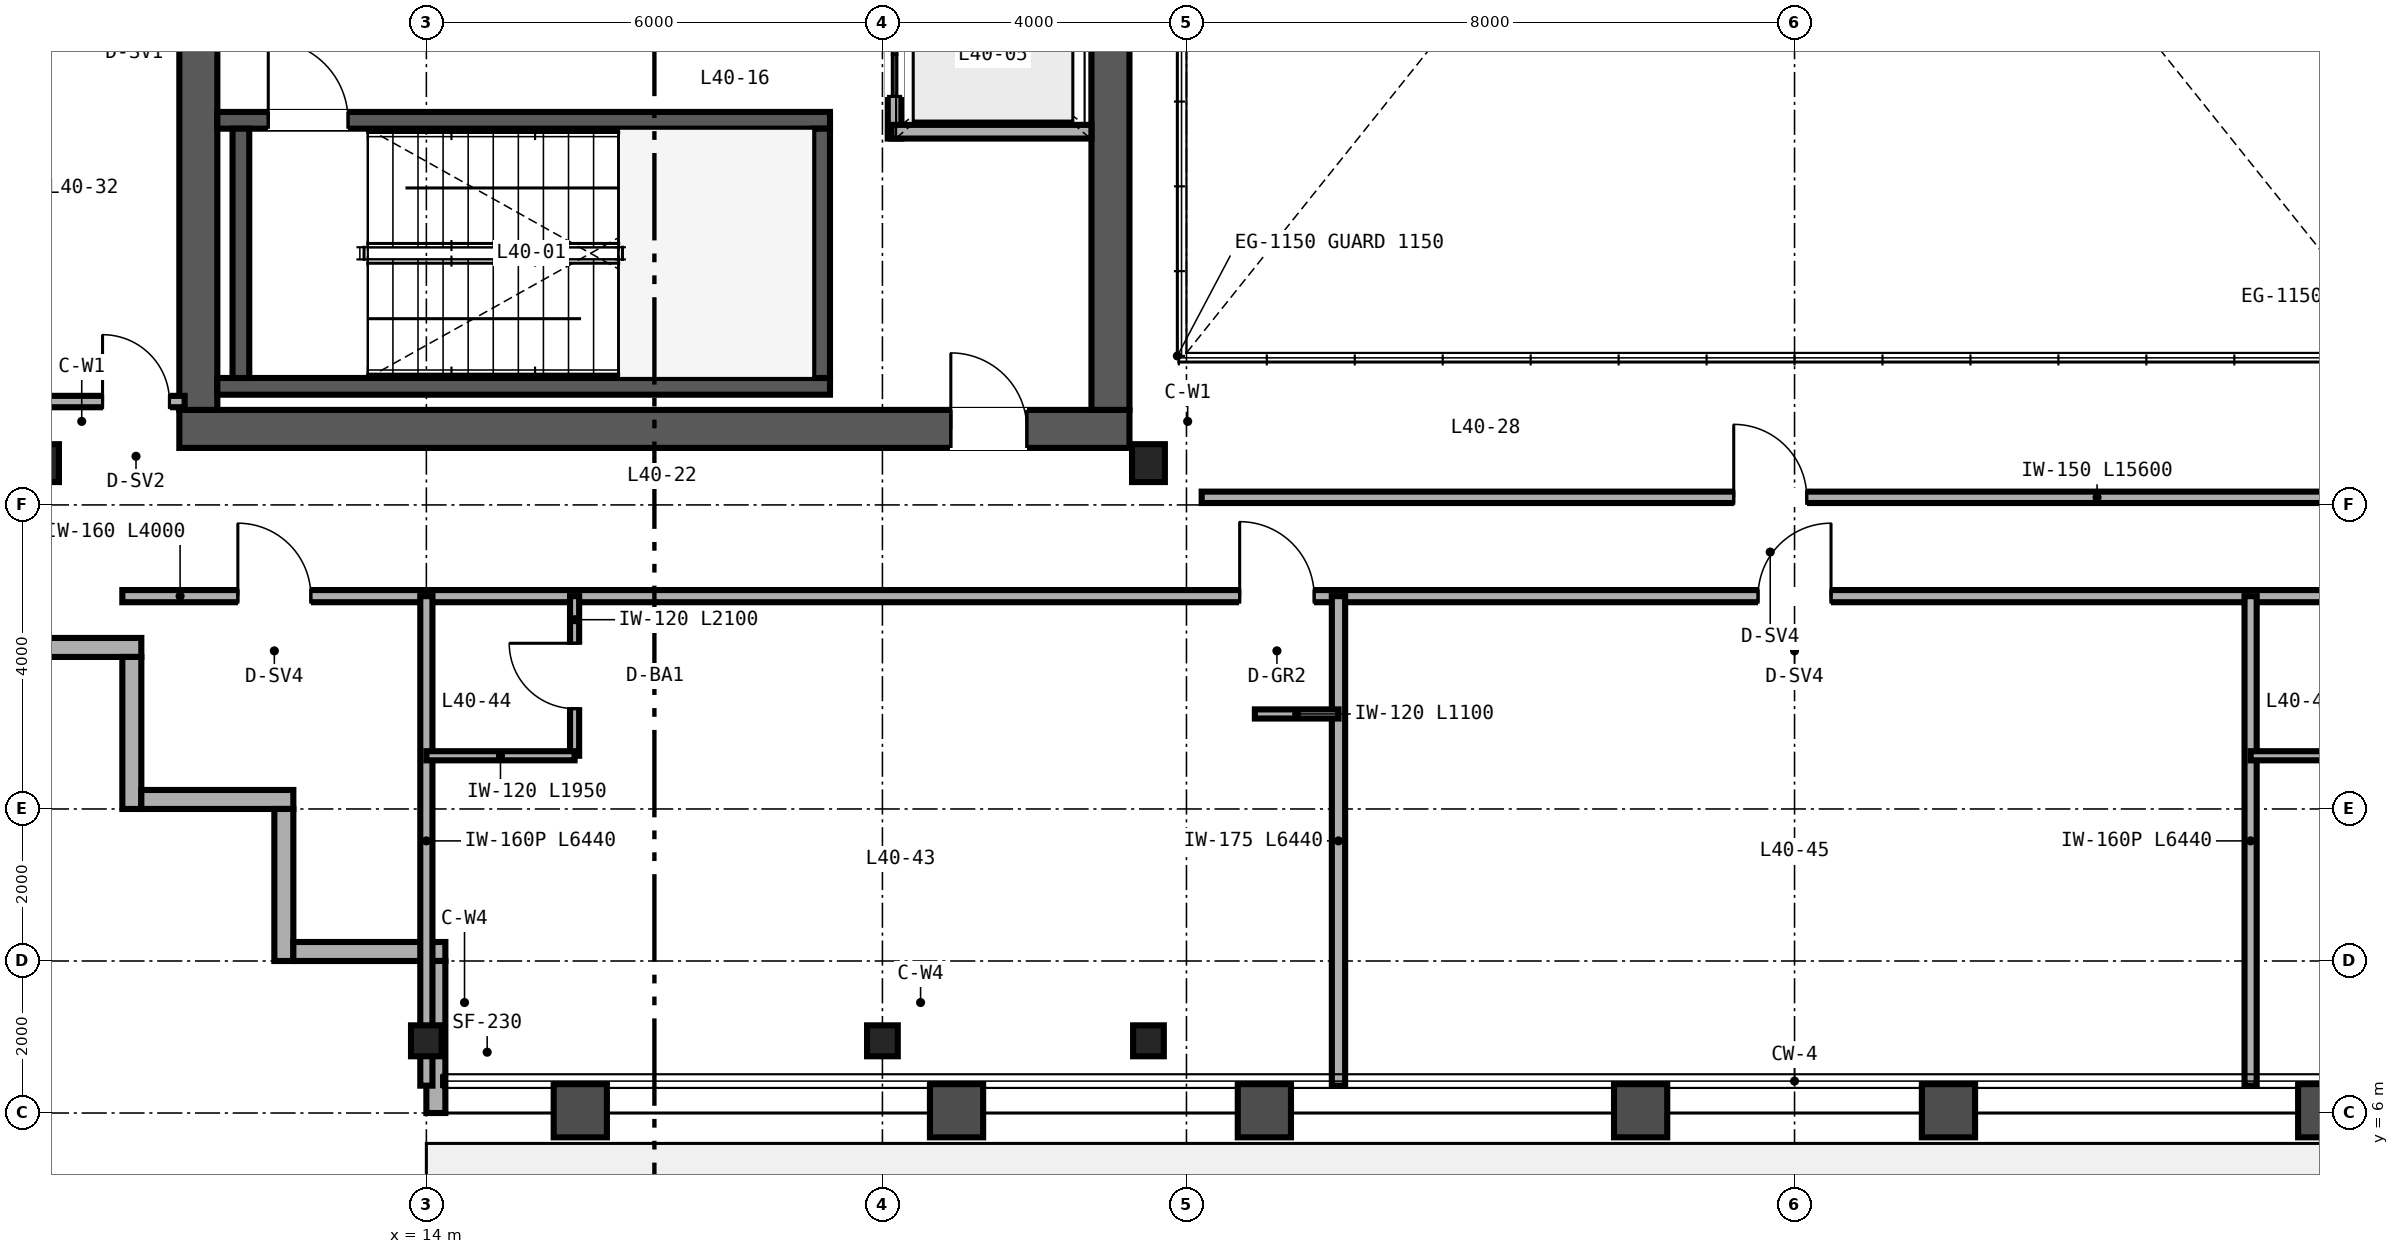
"""IFC4 building model, lengths in metres.
Left out: names, types, materials, properties, quantities, classifications, styles, units other than length and angle.
Written with IfcOpenShell. Run it as: python <this file> out.ifc"""

import sys

from ifc_helpers import new_model, si_unit, direction, frame, frame_2d, origin, origin_2d, place, context, subcontext, project, spatial, rectangle, i_section, extrude, source, transform, mapped, element, fill, save


model = new_model("IFC4")
c1 = context("Model", 3, precision=1e-05, world=origin(), true_north=direction((0.0, 1.0)))
c2 = subcontext(c1, "Body", "Model", "MODEL_VIEW")
j1 = project(units=[si_unit("LENGTHUNIT", "METRE"), si_unit("PLANEANGLEUNIT", "RADIAN")], contexts=[c1])
p1 = place(None, origin())
s1 = spatial("IfcSite", under=j1, at=p1, CompositionType="ELEMENT")
p2 = place(p1, origin())
s2 = spatial("IfcBuilding", under=s1, at=p2, CompositionType="ELEMENT")
p3 = place(p2, frame((0.0, 0.0, 163.2)))
s3 = spatial("IfcBuildingStorey", under=s2, at=p3, CompositionType="ELEMENT", Elevation=163.2)
p4 = place(p3, frame((10.75, 15.0, 0.0), z_axis=(0.0, 0.0, 1.0), x_axis=(1.0, 0.0, 0.0)))
e1 = element("IfcWall", 1, at=p4, inside=s3, PredefinedType="SHEAR", context=c2, shape_type="SweptSolid", body=[
    extrude(rectangle(XDim=12.5, YDim=0.5, at=frame_2d((6.25, 0.0))), origin(), (0.0, 0.0, 1.0), 3.37),
])
p5 = place(p4, frame((10.15, 0.0, 0.0)))
e2 = element("IfcOpeningElement", 2, at=p5, cuts=e1, PredefinedType="OPENING", context=c2, shape_type="SweptSolid", body=[
    extrude(rectangle(XDim=1.0, YDim=2.15, at=frame_2d((0.5, 1.075))), frame((0.0, 0.26, 0.0), z_axis=(0.0, -1.0, 0.0), x_axis=(1.0, 0.0, 0.0)), (0.0, 0.0, 1.0), 0.52),
])
for number, where, z_axis, x_axis in (
    (3, (11.0, 15.25, 0.0), (0.0, 0.0, 1.0), (0.0, 1.0, 0.0)),
    (4, (23.0, 15.25, 0.0), (0.0, 0.0, 1.0), (0.0, 1.0, 0.0)),
):
    element("IfcWall", number, at=place(p3, frame(where, z_axis=z_axis, x_axis=x_axis)), inside=s3, PredefinedType="SHEAR", context=c2, shape_type="SweptSolid", body=[
        extrude(rectangle(XDim=21.5, YDim=0.5, at=frame_2d((10.75, 0.0))), origin(), (0.0, 0.0, 1.0), 3.37),
    ])
p6 = place(p3, frame((11.25, 15.56, 0.0), z_axis=(0.0, 0.0, 1.0), x_axis=(1.0, 0.0, 0.0)))
e5 = element("IfcWall", 5, at=p6, inside=s3, PredefinedType="SHEAR", context=c2, shape_type="SweptSolid", body=[
    extrude(rectangle(XDim=8.06, YDim=0.22, at=frame_2d((4.03, 0.0))), origin(), (0.0, 0.0, 1.0), 3.4),
])
p7 = place(p3, frame((11.25, 19.06, 0.0), z_axis=(0.0, 0.0, 1.0), x_axis=(1.0, 0.0, 0.0)))
e6 = element("IfcWall", 6, at=p7, inside=s3, PredefinedType="SHEAR", context=c2, shape_type="SweptSolid", body=[
    extrude(rectangle(XDim=8.06, YDim=0.22, at=frame_2d((4.03, 0.0))), origin(), (0.0, 0.0, 1.0), 3.4),
])
p8 = place(p7, frame((0.67, 0.0, 0.0)))
e7 = element("IfcOpeningElement", 7, at=p8, cuts=e6, PredefinedType="OPENING", context=c2, shape_type="SweptSolid", body=[
    extrude(rectangle(XDim=1.05, YDim=2.15, at=frame_2d((0.525, 1.075))), frame((0.0, 0.12, 0.0), z_axis=(0.0, -1.0, 0.0), x_axis=(1.0, 0.0, 0.0)), (0.0, 0.0, 1.0), 0.24),
])
for number, where, z_axis, x_axis in (
    (8, (11.56, 15.67, 0.0), (0.0, 0.0, 1.0), (0.0, 1.0, 0.0)),
    (9, (19.2, 15.67, 0.0), (0.0, 0.0, 1.0), (0.0, 1.0, 0.0)),
):
    element("IfcWall", number, at=place(p3, frame(where, z_axis=z_axis, x_axis=x_axis)), inside=s3, PredefinedType="SHEAR", context=c2, shape_type="SweptSolid", body=[
        extrude(rectangle(XDim=3.28, YDim=0.22, at=frame_2d((1.64, 0.0))), origin(), (0.0, 0.0, 1.0), 3.4),
    ])
m1 = source(origin(), c2, "Body", "SweptSolid", [
    extrude(i_section(OverallWidth=0.432, OverallDepth=0.498, WebThickness=0.056, FlangeThickness=0.089, FilletRadius=0.025, at=origin_2d()), origin(), (0.0, 0.0, 1.0), 3.37),
])
for number, where, z_axis, x_axis in (
    (10, (8.95, 14.55, 0.0), (0.0, 0.0, 1.0), (1.0, 0.0, 0.0)),
    (11, (23.5, 14.55, 0.0), (0.0, 0.0, 1.0), (1.0, 0.0, 0.0)),
):
    element("IfcColumn", number, at=place(p3, frame(where, z_axis=z_axis, x_axis=x_axis)), inside=s3, PredefinedType="COLUMN", context=c2, shape_type="MappedRepresentation", body=[
        mapped(m1, transform((0.0, 0.0, 0.0), scale=1.0)),
    ])
m2 = source(origin(), c2, "Body", "SweptSolid", [
    extrude(i_section(OverallWidth=0.404, OverallDepth=0.407, WebThickness=0.027, FlangeThickness=0.044, FilletRadius=0.025, at=origin_2d()), origin(), (0.0, 0.0, 1.0), 3.37),
])
for number, where, z_axis, x_axis in (
    (12, (14.0, 6.95, 0.0), (0.0, 0.0, 1.0), (1.0, 0.0, 0.0)),
    (13, (20.0, 6.95, 0.0), (0.0, 0.0, 1.0), (1.0, 0.0, 0.0)),
    (14, (23.5, 6.95, 0.0), (0.0, 0.0, 1.0), (1.0, 0.0, 0.0)),
):
    element("IfcColumn", number, at=place(p3, frame(where, z_axis=z_axis, x_axis=x_axis)), inside=s3, PredefinedType="COLUMN", context=c2, shape_type="MappedRepresentation", body=[
        mapped(m2, transform((0.0, 0.0, 0.0), scale=1.0)),
    ])
p9 = place(p3, frame((8.0, 12.125, 0.0), z_axis=(0.0, 0.0, 1.0), x_axis=(1.0, 0.0, 0.0)))
e15 = element("IfcWall", 15, at=p9, inside=s3, PredefinedType="SOLIDWALL", context=c2, shape_type="SweptSolid", body=[
    extrude(rectangle(XDim=2.25, YDim=0.25, at=frame_2d((1.125, 0.0))), origin(), (0.0, 0.0, 1.0), 3.37),
])
for number, where, z_axis, x_axis in (
    (16, (10.125, 12.0, 0.0), (0.0, 0.0, 1.0), (0.0, -1.0, 0.0)),
    (17, (10.25, 10.125, 0.0), (0.0, 0.0, 1.0), (1.0, 0.0, 0.0)),
    (18, (12.125, 10.0, 0.0), (0.0, 0.0, 1.0), (0.0, -1.0, 0.0)),
    (19, (12.25, 8.125, 0.0), (0.0, 0.0, 1.0), (1.0, 0.0, 0.0)),
):
    element("IfcWall", number, at=place(p3, frame(where, z_axis=z_axis, x_axis=x_axis)), inside=s3, PredefinedType="SOLIDWALL", context=c2, shape_type="SweptSolid", body=[
        extrude(rectangle(XDim=2.0, YDim=0.25, at=frame_2d((1.0, 0.0))), origin(), (0.0, 0.0, 1.0), 3.37),
    ])
p10 = place(p3, frame((14.125, 8.0, 0.0), z_axis=(0.0, 0.0, 1.0), x_axis=(0.0, -1.0, 0.0)))
e20 = element("IfcWall", 20, at=p10, inside=s3, PredefinedType="SOLIDWALL", context=c2, shape_type="SweptSolid", body=[
    extrude(rectangle(XDim=2.0, YDim=0.25, at=frame_2d((1.0, 0.0))), origin(), (0.0, 0.0, 1.0), 2.677),
])
p11 = place(p3, frame((20.16, 18.82, 0.0), z_axis=(0.0, 0.0, 1.0), x_axis=(0.0, 1.0, 0.0)))
e21 = element("IfcWall", 21, at=p11, inside=s3, PredefinedType="SOLIDWALL", context=c2, shape_type="SweptSolid", body=[
    extrude(rectangle(XDim=6.32, YDim=0.18, at=frame_2d((3.16, 0.0))), origin(), (0.0, 0.0, 1.0), 2.47),
])
p12 = place(p11, frame((0.555, 0.0, 0.0)))
e22 = element("IfcOpeningElement", 22, at=p12, cuts=e21, PredefinedType="OPENING", context=c2, shape_type="SweptSolid", body=[
    extrude(rectangle(XDim=1.1, YDim=2.2, at=frame_2d((0.55, 1.1))), frame((0.0, 0.1, 0.0), z_axis=(0.0, -1.0, 0.0), x_axis=(1.0, 0.0, 0.0)), (0.0, 0.0, 1.0), 0.2),
])
p13 = place(p11, frame((2.635, 0.0, 0.0)))
e23 = element("IfcOpeningElement", 23, at=p13, cuts=e21, PredefinedType="OPENING", context=c2, shape_type="SweptSolid", body=[
    extrude(rectangle(XDim=1.1, YDim=2.2, at=frame_2d((0.55, 1.1))), frame((0.0, 0.1, 0.0), z_axis=(0.0, -1.0, 0.0), x_axis=(1.0, 0.0, 0.0)), (0.0, 0.0, 1.0), 0.2),
])
p14 = place(p11, frame((4.69, 0.0, 0.0)))
e24 = element("IfcOpeningElement", 24, at=p14, cuts=e21, PredefinedType="OPENING", context=c2, shape_type="SweptSolid", body=[
    extrude(rectangle(XDim=1.1, YDim=2.2, at=frame_2d((0.55, 1.1))), frame((0.0, 0.1, 0.0), z_axis=(0.0, -1.0, 0.0), x_axis=(1.0, 0.0, 0.0)), (0.0, 0.0, 1.0), 0.2),
])
p15 = place(p3, frame((20.12, 18.91, 0.0), z_axis=(0.0, 0.0, 1.0), x_axis=(1.0, 0.0, 0.0)))
e25 = element("IfcWall", 25, at=p15, inside=s3, PredefinedType="SOLIDWALL", context=c2, shape_type="SweptSolid", body=[
    extrude(rectangle(XDim=2.63, YDim=0.18, at=frame_2d((1.315, 0.0))), origin(), (0.0, 0.0, 1.0), 3.37),
])
p16 = place(p3, frame((24.2, 14.1, 0.0), z_axis=(0.0, 0.0, 1.0), x_axis=(1.0, 0.0, 0.0)))
e26 = element("IfcWall", 26, at=p16, inside=s3, PredefinedType="PARTITIONING", context=c2, shape_type="SweptSolid", body=[
    extrude(rectangle(XDim=15.6, YDim=0.15, at=frame_2d((7.8, 0.0))), origin(), (0.0, 0.0, 1.0), 3.37),
])
p17 = place(p16, frame((7.0, 0.0, 0.0)))
e27 = element("IfcOpeningElement", 27, at=p17, cuts=e26, PredefinedType="OPENING", context=c2, shape_type="SweptSolid", body=[
    extrude(rectangle(XDim=0.96, YDim=2.15, at=frame_2d((0.48, 1.075))), frame((0.0, 0.085, 0.0), z_axis=(0.0, -1.0, 0.0), x_axis=(1.0, 0.0, 0.0)), (0.0, 0.0, 1.0), 0.17),
])
p18 = place(p3, frame((8.16, 15.36, 0.0), z_axis=(0.0, 0.0, 1.0), x_axis=(1.0, 0.0, 0.0)))
e28 = element("IfcWall", 28, at=p18, inside=s3, PredefinedType="PARTITIONING", context=c2, shape_type="SweptSolid", body=[
    extrude(rectangle(XDim=2.66, YDim=0.15, at=frame_2d((1.33, 0.0))), origin(), (0.0, 0.0, 1.0), 2.591),
])
p19 = place(p18, frame((1.58, 0.0, 0.0)))
e29 = element("IfcOpeningElement", 29, at=p19, cuts=e28, PredefinedType="OPENING", context=c2, shape_type="SweptSolid", body=[
    extrude(rectangle(XDim=0.88, YDim=2.15, at=frame_2d((0.44, 1.075))), frame((0.0, 0.085, 0.0), z_axis=(0.0, -1.0, 0.0), x_axis=(1.0, 0.0, 0.0)), (0.0, 0.0, 1.0), 0.17),
])
p20 = place(p3, frame((10.0, 12.8, 0.0), z_axis=(0.0, 0.0, 1.0), x_axis=(1.0, 0.0, 0.0)))
e30 = element("IfcWall", 30, at=p20, inside=s3, PredefinedType="PARTITIONING", context=c2, shape_type="SweptSolid", body=[
    extrude(rectangle(XDim=4.0, YDim=0.16, at=frame_2d((2.0, 0.0))), origin(), (0.0, 0.0, 1.0), 3.37),
])
p21 = place(p20, frame((1.52, 0.0, 0.0)))
e31 = element("IfcOpeningElement", 31, at=p21, cuts=e30, PredefinedType="OPENING", context=c2, shape_type="SweptSolid", body=[
    extrude(rectangle(XDim=0.96, YDim=2.15, at=frame_2d((0.48, 1.075))), frame((0.0, 0.09, 0.0), z_axis=(0.0, -1.0, 0.0), x_axis=(1.0, 0.0, 0.0)), (0.0, 0.0, 1.0), 0.18),
])
p22 = place(p3, frame((14.0, 12.8, 0.0), z_axis=(0.0, 0.0, 1.0), x_axis=(1.0, 0.0, 0.0)))
e32 = element("IfcWall", 32, at=p22, inside=s3, PredefinedType="PARTITIONING", context=c2, shape_type="SweptSolid", body=[
    extrude(rectangle(XDim=36.0, YDim=0.16, at=frame_2d((18.0, 0.0))), origin(), (0.0, 0.0, 1.0), 2.913),
])
p23 = place(p22, frame((10.7, 0.0, 0.0)))
e33 = element("IfcOpeningElement", 33, at=p23, cuts=e32, PredefinedType="OPENING", context=c2, shape_type="SweptSolid", body=[
    extrude(rectangle(XDim=0.98, YDim=2.2, at=frame_2d((0.49, 1.1))), frame((0.0, 0.09, 0.0), z_axis=(0.0, -1.0, 0.0), x_axis=(1.0, 0.0, 0.0)), (0.0, 0.0, 1.0), 0.18),
])
p24 = place(p22, frame((17.52, 0.0, 0.0)))
e34 = element("IfcOpeningElement", 34, at=p24, cuts=e32, PredefinedType="OPENING", context=c2, shape_type="SweptSolid", body=[
    extrude(rectangle(XDim=0.96, YDim=2.15, at=frame_2d((0.48, 1.075))), frame((0.0, 0.09, 0.0), z_axis=(0.0, -1.0, 0.0), x_axis=(1.0, 0.0, 0.0)), (0.0, 0.0, 1.0), 0.18),
])
p25 = place(p22, frame((34.7, 0.0, 0.0)))
e35 = element("IfcOpeningElement", 35, at=p25, cuts=e32, PredefinedType="OPENING", context=c2, shape_type="SweptSolid", body=[
    extrude(rectangle(XDim=0.98, YDim=2.2, at=frame_2d((0.49, 1.1))), frame((0.0, 0.09, 0.0), z_axis=(0.0, -1.0, 0.0), x_axis=(1.0, 0.0, 0.0)), (0.0, 0.0, 1.0), 0.18),
])
p26 = place(p3, frame((14.0, 6.36, 0.0), z_axis=(0.0, 0.0, 1.0), x_axis=(0.0, 1.0, 0.0)))
e36 = element("IfcWall", 36, at=p26, inside=s3, PredefinedType="PARTITIONING", context=c2, shape_type="SweptSolid", body=[
    extrude(rectangle(XDim=6.44, YDim=0.16, at=frame_2d((3.22, 0.0))), origin(), (0.0, 0.0, 1.0), 2.677),
])
p27 = place(p3, frame((26.0, 6.36, 0.0), z_axis=(0.0, 0.0, 1.0), x_axis=(0.0, 1.0, 0.0)))
e37 = element("IfcWall", 37, at=p27, inside=s3, PredefinedType="PARTITIONING", context=c2, shape_type="SweptSolid", body=[
    extrude(rectangle(XDim=6.44, YDim=0.175, at=frame_2d((3.22, 0.0))), origin(), (0.0, 0.0, 1.0), 2.443),
])
p28 = place(p3, frame((15.95, 10.7, 0.0), z_axis=(0.0, 0.0, 1.0), x_axis=(0.0, 1.0, 0.0)))
e38 = element("IfcWall", 38, at=p28, inside=s3, PredefinedType="PARTITIONING", context=c2, shape_type="SweptSolid", body=[
    extrude(rectangle(XDim=2.1, YDim=0.12, at=frame_2d((1.05, 0.0))), origin(), (0.0, 0.0, 1.0), 3.37),
])
p29 = place(p28, frame((0.62, 0.0, 0.0)))
e39 = element("IfcOpeningElement", 39, at=p29, cuts=e38, PredefinedType="OPENING", context=c2, shape_type="SweptSolid", body=[
    extrude(rectangle(XDim=0.86, YDim=2.1, at=frame_2d((0.43, 1.05))), frame((0.0, 0.07, 0.0), z_axis=(0.0, -1.0, 0.0), x_axis=(1.0, 0.0, 0.0)), (0.0, 0.0, 1.0), 0.14),
])
p30 = place(p3, frame((14.0, 10.7, 0.0), z_axis=(0.0, 0.0, 1.0), x_axis=(1.0, 0.0, 0.0)))
e40 = element("IfcWall", 40, at=p30, inside=s3, PredefinedType="PARTITIONING", context=c2, shape_type="SweptSolid", body=[
    extrude(rectangle(XDim=1.95, YDim=0.12, at=frame_2d((0.975, 0.0))), origin(), (0.0, 0.0, 1.0), 3.37),
])
p31 = place(p3, frame((24.9, 11.25, 0.0), z_axis=(0.0, 0.0, 1.0), x_axis=(1.0, 0.0, 0.0)))
e41 = element("IfcWall", 41, at=p31, inside=s3, PredefinedType="PARTITIONING", context=c2, shape_type="SweptSolid", body=[
    extrude(rectangle(XDim=1.1, YDim=0.12, at=frame_2d((0.55, 0.0))), origin(), (0.0, 0.0, 1.0), 3.37),
])
p32 = place(p3, frame((38.0, 6.36, 0.0), z_axis=(0.0, 0.0, 1.0), x_axis=(0.0, 1.0, 0.0)))
e42 = element("IfcWall", 42, at=p32, inside=s3, PredefinedType="PARTITIONING", context=c2, shape_type="SweptSolid", body=[
    extrude(rectangle(XDim=6.44, YDim=0.16, at=frame_2d((3.22, 0.0))), origin(), (0.0, 0.0, 1.0), 2.443),
])
p33 = place(p3, frame((38.0, 10.7, 0.0), z_axis=(0.0, 0.0, 1.0), x_axis=(1.0, 0.0, 0.0)))
e43 = element("IfcWall", 43, at=p33, inside=s3, PredefinedType="PARTITIONING", context=c2, shape_type="SweptSolid", body=[
    extrude(rectangle(XDim=1.95, YDim=0.12, at=frame_2d((0.975, 0.0))), origin(), (0.0, 0.0, 1.0), 3.37),
])
m3 = source(origin(), c2, "Body", "SweptSolid", [
    extrude(rectangle(XDim=1.05, YDim=2.15, at=frame_2d((0.525, 1.075))), frame((0.0, 0.025, 0.0), z_axis=(0.0, -1.0, 0.0), x_axis=(1.0, 0.0, 0.0)), (0.0, 0.0, 1.0), 0.05),
])
p34 = place(p8, origin())
e44 = element("IfcDoor", 44, at=p34, inside=s3, OperationType="SINGLE_SWING_LEFT", PredefinedType="DOOR", context=c2, shape_type="MappedRepresentation", body=[
    mapped(m3, transform((0.0, 0.0, 0.0), scale=1.0)),
])
fill(e7, e44)
m4 = source(origin(), c2, "Body", "SweptSolid", [
    extrude(rectangle(XDim=1.1, YDim=2.2, at=frame_2d((0.55, 1.1))), frame((0.0, 0.025, 0.0), z_axis=(0.0, -1.0, 0.0), x_axis=(1.0, 0.0, 0.0)), (0.0, 0.0, 1.0), 0.05),
])
p35 = place(p12, origin())
e45 = element("IfcDoor", 45, at=p35, inside=s3, OperationType="DOUBLE_DOOR_SLIDING", PredefinedType="DOOR", context=c2, shape_type="MappedRepresentation", body=[
    mapped(m4, transform((0.0, 0.0, 0.0), scale=1.0)),
])
fill(e22, e45)
m5 = source(origin(), c2, "Body", "SweptSolid", [
    extrude(rectangle(XDim=1.0, YDim=2.15, at=frame_2d((0.5, 1.075))), frame((0.0, 0.025, 0.0), z_axis=(0.0, -1.0, 0.0), x_axis=(1.0, 0.0, 0.0)), (0.0, 0.0, 1.0), 0.05),
])
p36 = place(p5, origin())
e46 = element("IfcDoor", 46, at=p36, inside=s3, OperationType="SINGLE_SWING_LEFT", PredefinedType="DOOR", context=c2, shape_type="MappedRepresentation", body=[
    mapped(m5, transform((0.0, 0.0, 0.0), scale=1.0)),
])
fill(e2, e46)
m6 = source(origin(), c2, "Body", "SweptSolid", [
    extrude(rectangle(XDim=0.96, YDim=2.15, at=frame_2d((0.48, 1.075))), frame((0.0, 0.025, 0.0), z_axis=(0.0, -1.0, 0.0), x_axis=(1.0, 0.0, 0.0)), (0.0, 0.0, 1.0), 0.05),
])
p37 = place(p17, origin())
e47 = element("IfcDoor", 47, at=p37, inside=s3, OperationType="SINGLE_SWING_LEFT", PredefinedType="DOOR", context=c2, shape_type="MappedRepresentation", body=[
    mapped(m6, transform((0.0, 0.0, 0.0), scale=1.0)),
])
fill(e27, e47)
m7 = source(origin(), c2, "Body", "SweptSolid", [
    extrude(rectangle(XDim=0.88, YDim=2.15, at=frame_2d((0.44, 1.075))), frame((0.0, 0.025, 0.0), z_axis=(0.0, -1.0, 0.0), x_axis=(1.0, 0.0, 0.0)), (0.0, 0.0, 1.0), 0.05),
])
p38 = place(p19, origin())
e48 = element("IfcDoor", 48, at=p38, inside=s3, OperationType="SINGLE_SWING_LEFT", PredefinedType="DOOR", context=c2, shape_type="MappedRepresentation", body=[
    mapped(m7, transform((0.0, 0.0, 0.0), scale=1.0)),
])
fill(e29, e48)
p39 = place(p21, origin())
e49 = element("IfcDoor", 49, at=p39, inside=s3, OperationType="SINGLE_SWING_LEFT", PredefinedType="DOOR", context=c2, shape_type="MappedRepresentation", body=[
    mapped(m6, transform((0.0, 0.0, 0.0), scale=1.0)),
])
fill(e31, e49)
m8 = source(origin(), c2, "Body", "SweptSolid", [
    extrude(rectangle(XDim=0.86, YDim=2.1, at=frame_2d((0.43, 1.05))), frame((0.0, 0.025, 0.0), z_axis=(0.0, -1.0, 0.0), x_axis=(1.0, 0.0, 0.0)), (0.0, 0.0, 1.0), 0.05),
])
p40 = place(p29, origin())
e50 = element("IfcDoor", 50, at=p40, inside=s3, OperationType="SINGLE_SWING_RIGHT", PredefinedType="DOOR", context=c2, shape_type="MappedRepresentation", body=[
    mapped(m8, transform((0.0, 0.0, 0.0), scale=1.0)),
])
fill(e39, e50)
m9 = source(origin(), c2, "Body", "SweptSolid", [
    extrude(rectangle(XDim=0.98, YDim=2.2, at=frame_2d((0.49, 1.1))), frame((0.0, 0.025, 0.0), z_axis=(0.0, -1.0, 0.0), x_axis=(1.0, 0.0, 0.0)), (0.0, 0.0, 1.0), 0.05),
])
p41 = place(p23, origin())
e51 = element("IfcDoor", 51, at=p41, inside=s3, OperationType="SINGLE_SWING_LEFT", PredefinedType="DOOR", context=c2, shape_type="MappedRepresentation", body=[
    mapped(m9, transform((0.0, 0.0, 0.0), scale=1.0)),
])
fill(e33, e51)
p42 = place(p24, origin())
e52 = element("IfcDoor", 52, at=p42, inside=s3, OperationType="SINGLE_SWING_RIGHT", PredefinedType="DOOR", context=c2, shape_type="MappedRepresentation", body=[
    mapped(m6, transform((0.0, 0.0, 0.0), scale=1.0)),
])
fill(e34, e52)
save(model, sys.argv[1])
